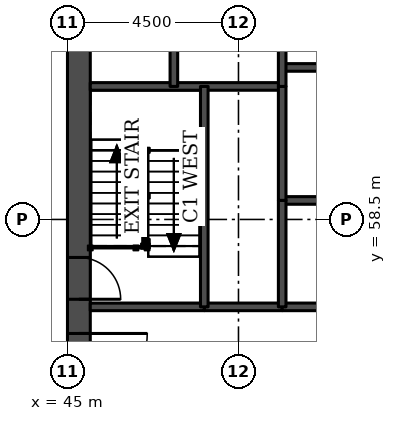
"""IFC4 building model, lengths in metres.
Left out: names, types, materials, properties, quantities, classifications, styles, units other than length and angle.
Written with IfcOpenShell. Run it as: python <this file> out.ifc"""

import sys

from ifc_helpers import new_model, si_unit, direction, frame, frame_2d, origin, place, context, subcontext, project, spatial, rectangle, extrude, element, fill, save


model = new_model("IFC4")
c1 = context("Model", 3, precision=1e-05, world=origin(), true_north=direction((0.0, 1.0)))
c2 = subcontext(c1, "Body", "Model", "MODEL_VIEW")
j1 = project(units=[si_unit("LENGTHUNIT", "METRE"), si_unit("PLANEANGLEUNIT", "RADIAN")], contexts=[c1])
p1 = place(None, origin())
s1 = spatial("IfcSite", under=j1, at=p1, CompositionType="ELEMENT")
p2 = place(p1, origin())
s2 = spatial("IfcBuilding", under=s1, at=p2, CompositionType="ELEMENT")
p3 = place(p2, frame((0.0, 0.0, 13.5)))
s3 = spatial("IfcBuildingStorey", under=s2, at=p3, CompositionType="ELEMENT", Elevation=13.5)
p4 = place(p3, frame((45.3, 49.5, 0.0), z_axis=(0.0, 0.0, 1.0), x_axis=(0.0, 1.0, 0.0)))
e1 = element("IfcWall", 1, at=p4, inside=s3, PredefinedType="SHEAR", context=c2, shape_type="SweptSolid", body=[
    extrude(rectangle(XDim=22.5, YDim=0.6, at=frame_2d((11.25, 0.0))), origin(), (0.0, 0.0, 1.0), 5.0),
])
p5 = place(p4, frame((4.2, 0.0, 0.0)))
e2 = element("IfcOpeningElement", 2, at=p5, cuts=e1, PredefinedType="OPENING", context=c2, shape_type="SweptSolid", body=[
    extrude(rectangle(XDim=1.8, YDim=2.1, at=frame_2d((0.9, 1.05))), frame((0.0, 0.31, 0.0), z_axis=(0.0, -1.0, 0.0), x_axis=(1.0, 0.0, 0.0)), (0.0, 0.0, 1.0), 0.62),
])
p6 = place(p4, frame((6.9, 0.0, 0.0)))
e3 = element("IfcOpeningElement", 3, at=p6, cuts=e1, PredefinedType="OPENING", context=c2, shape_type="SweptSolid", body=[
    extrude(rectangle(XDim=1.1, YDim=2.1, at=frame_2d((0.55, 1.05))), frame((0.0, 0.31, 0.0), z_axis=(0.0, -1.0, 0.0), x_axis=(1.0, 0.0, 0.0)), (0.0, 0.0, 1.0), 0.62),
])
p7 = place(p4, frame((13.6, 0.0, 0.0)))
e4 = element("IfcOpeningElement", 4, at=p7, cuts=e1, PredefinedType="OPENING", context=c2, shape_type="SweptSolid", body=[
    extrude(rectangle(XDim=1.1, YDim=2.1, at=frame_2d((0.55, 1.05))), frame((0.0, 0.31, 0.0), z_axis=(0.0, -1.0, 0.0), x_axis=(1.0, 0.0, 0.0)), (0.0, 0.0, 1.0), 0.62),
])
p8 = place(p4, frame((16.5, 0.0, 0.0)))
e5 = element("IfcOpeningElement", 5, at=p8, cuts=e1, PredefinedType="OPENING", context=c2, shape_type="SweptSolid", body=[
    extrude(rectangle(XDim=1.8, YDim=2.1, at=frame_2d((0.9, 1.05))), frame((0.0, 0.31, 0.0), z_axis=(0.0, -1.0, 0.0), x_axis=(1.0, 0.0, 0.0)), (0.0, 0.0, 1.0), 0.62),
])
p9 = place(p3, frame((48.6, 56.2, 0.0), z_axis=(0.0, 0.0, 1.0), x_axis=(1.0, 0.0, 0.0)))
e6 = element("IfcWall", 6, at=p9, inside=s3, PredefinedType="SOLIDWALL", context=c2, shape_type="SweptSolid", body=[
    extrude(rectangle(XDim=2.05, YDim=0.2, at=frame_2d((1.025, 0.0))), origin(), (0.0, 0.0, 1.0), 4.78),
])
p10 = place(p3, frame((45.6, 56.2, 0.0), z_axis=(0.0, 0.0, 1.0), x_axis=(1.0, 0.0, 0.0)))
e7 = element("IfcWall", 7, at=p10, inside=s3, PredefinedType="SOLIDWALL", context=c2, shape_type="SweptSolid", body=[
    extrude(rectangle(XDim=3.0, YDim=0.2, at=frame_2d((1.5, 0.0))), origin(), (0.0, 0.0, 1.0), 4.78),
])
p11 = place(p3, frame((50.65, 56.2, 0.0), z_axis=(0.0, 0.0, 1.0), x_axis=(1.0, 0.0, 0.0)))
e8 = element("IfcWall", 8, at=p11, inside=s3, PredefinedType="SOLIDWALL", context=c2, shape_type="SweptSolid", body=[
    extrude(rectangle(XDim=11.2, YDim=0.2, at=frame_2d((5.6, 0.0))), origin(), (0.0, 0.0, 1.0), 4.78),
])
p12 = place(p3, frame((50.65, 59.0, 0.0), z_axis=(0.0, 0.0, 1.0), x_axis=(1.0, 0.0, 0.0)))
e9 = element("IfcWall", 9, at=p12, inside=s3, PredefinedType="SOLIDWALL", context=c2, shape_type="SweptSolid", body=[
    extrude(rectangle(XDim=11.2, YDim=0.2, at=frame_2d((5.6, 0.0))), origin(), (0.0, 0.0, 1.0), 5.0),
])
p13 = place(p3, frame((45.6, 62.0, 0.0), z_axis=(0.0, 0.0, 1.0), x_axis=(1.0, 0.0, 0.0)))
e10 = element("IfcWall", 10, at=p13, inside=s3, PredefinedType="SOLIDWALL", context=c2, shape_type="SweptSolid", body=[
    extrude(rectangle(XDim=5.05, YDim=0.2, at=frame_2d((2.525, 0.0))), origin(), (0.0, 0.0, 1.0), 4.78),
])
p14 = place(p3, frame((50.65, 62.5, 0.0), z_axis=(0.0, 0.0, 1.0), x_axis=(1.0, 0.0, 0.0)))
e11 = element("IfcWall", 11, at=p14, inside=s3, PredefinedType="SOLIDWALL", context=c2, shape_type="SweptSolid", body=[
    extrude(rectangle(XDim=11.2, YDim=0.2, at=frame_2d((5.6, 0.0))), origin(), (0.0, 0.0, 1.0), 5.0),
])
p15 = place(p3, frame((47.8, 62.0, 0.0), z_axis=(0.0, 0.0, 1.0), x_axis=(0.0, 1.0, 0.0)))
e12 = element("IfcWall", 12, at=p15, inside=s3, PredefinedType="SOLIDWALL", context=c2, shape_type="SweptSolid", body=[
    extrude(rectangle(XDim=3.3, YDim=0.2, at=frame_2d((1.65, 0.0))), origin(), (0.0, 0.0, 1.0), 4.78),
])
p16 = place(p15, frame((1.1, 0.0, 0.0)))
e13 = element("IfcOpeningElement", 13, at=p16, cuts=e12, PredefinedType="OPENING", context=c2, shape_type="SweptSolid", body=[
    extrude(rectangle(XDim=1.1, YDim=2.1, at=frame_2d((0.55, 1.05))), frame((0.0, 0.11, 0.0), z_axis=(0.0, -1.0, 0.0), x_axis=(1.0, 0.0, 0.0)), (0.0, 0.0, 1.0), 0.22),
])
p17 = place(p3, frame((48.6, 56.2, 0.0), z_axis=(0.0, 0.0, 1.0), x_axis=(0.0, 1.0, 0.0)))
e14 = element("IfcWall", 14, at=p17, inside=s3, PredefinedType="SOLIDWALL", context=c2, shape_type="SweptSolid", body=[
    extrude(rectangle(XDim=5.8, YDim=0.2, at=frame_2d((2.9, 0.0))), origin(), (0.0, 0.0, 1.0), 4.78),
])
p18 = place(p3, frame((50.65, 59.0, 0.0), z_axis=(0.0, 0.0, 1.0), x_axis=(0.0, 1.0, 0.0)))
e15 = element("IfcWall", 15, at=p18, inside=s3, PredefinedType="SOLIDWALL", context=c2, shape_type="SweptSolid", body=[
    extrude(rectangle(XDim=3.0, YDim=0.2, at=frame_2d((1.5, 0.0))), origin(), (0.0, 0.0, 1.0), 5.0),
])
p19 = place(p3, frame((50.65, 56.2, 0.0), z_axis=(0.0, 0.0, 1.0), x_axis=(0.0, 1.0, 0.0)))
e16 = element("IfcWall", 16, at=p19, inside=s3, PredefinedType="SOLIDWALL", context=c2, shape_type="SweptSolid", body=[
    extrude(rectangle(XDim=2.8, YDim=0.2, at=frame_2d((1.4, 0.0))), origin(), (0.0, 0.0, 1.0), 4.78),
])
p20 = place(p3, frame((50.65, 62.0, 0.0), z_axis=(0.0, 0.0, 1.0), x_axis=(0.0, 1.0, 0.0)))
e17 = element("IfcWall", 17, at=p20, inside=s3, PredefinedType="SOLIDWALL", context=c2, shape_type="SweptSolid", body=[
    extrude(rectangle(XDim=3.3, YDim=0.2, at=frame_2d((1.65, 0.0))), origin(), (0.0, 0.0, 1.0), 4.78),
])
p21 = place(p5, frame((1.8, 0.0, 0.0), z_axis=(0.0, 0.0, 1.0), x_axis=(-1.0, 0.0, 0.0)))
e18 = element("IfcDoor", 18, at=p21, inside=s3, OperationType="SINGLE_SWING_LEFT", PredefinedType="DOOR", context=c2, shape_type="SweptSolid", body=[
    extrude(rectangle(XDim=1.8, YDim=2.1, at=frame_2d((0.9, 1.05))), frame((0.0, 0.025, 0.0), z_axis=(0.0, -1.0, 0.0), x_axis=(1.0, 0.0, 0.0)), (0.0, 0.0, 1.0), 0.05),
])
fill(e2, e18)
p22 = place(p6, frame((1.1, 0.0, 0.0), z_axis=(0.0, 0.0, 1.0), x_axis=(-1.0, 0.0, 0.0)))
e19 = element("IfcDoor", 19, at=p22, inside=s3, OperationType="SINGLE_SWING_RIGHT", PredefinedType="DOOR", context=c2, shape_type="SweptSolid", body=[
    extrude(rectangle(XDim=1.1, YDim=2.1, at=frame_2d((0.55, 1.05))), frame((0.0, 0.025, 0.0), z_axis=(0.0, -1.0, 0.0), x_axis=(1.0, 0.0, 0.0)), (0.0, 0.0, 1.0), 0.05),
])
fill(e3, e19)
save(model, sys.argv[1])
